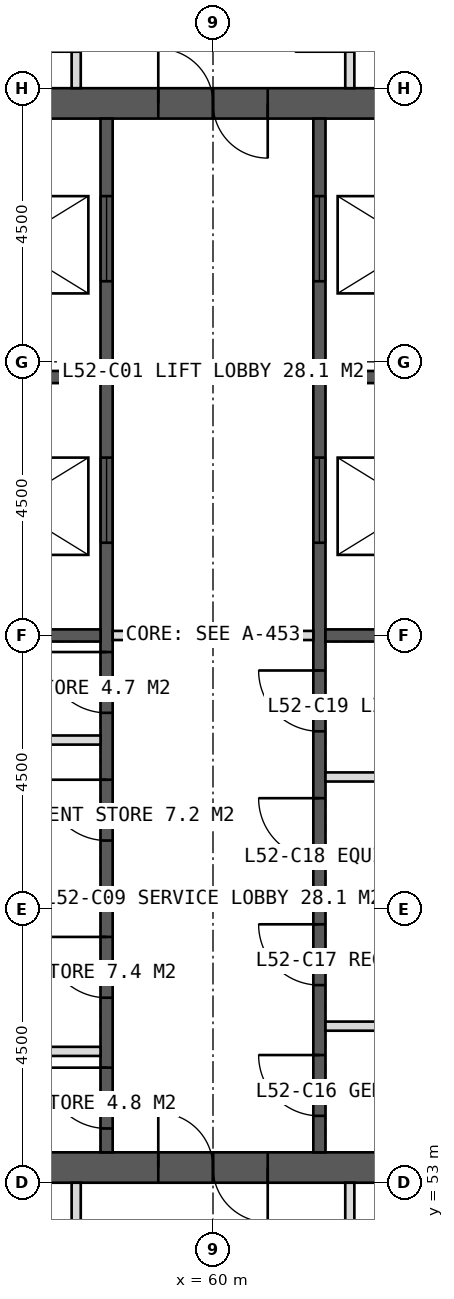
"""IFC4 building model, lengths in metres.
Left out: names, types, materials, properties, quantities, classifications, styles, units other than length and angle.
Written with IfcOpenShell. Run it as: python <this file> out.ifc"""

import sys

from ifc_helpers import new_model, si_unit, direction, frame, frame_2d, origin, place, context, subcontext, project, spatial, rectangle, extrude, element, fill, save


model = new_model("IFC4")
c1 = context("Model", 3, precision=1e-05, world=origin(), true_north=direction((0.0, 1.0)))
c2 = subcontext(c1, "Body", "Model", "MODEL_VIEW")
j1 = project(units=[si_unit("LENGTHUNIT", "METRE"), si_unit("PLANEANGLEUNIT", "RADIAN")], contexts=[c1])
p1 = place(None, origin())
s1 = spatial("IfcSite", under=j1, at=p1, CompositionType="ELEMENT")
p2 = place(p1, origin())
s2 = spatial("IfcBuilding", under=s1, at=p2, CompositionType="ELEMENT")
p3 = place(p2, frame((0.0, 0.0, 217.0)))
s3 = spatial("IfcBuildingStorey", under=s2, at=p3, CompositionType="ELEMENT", Elevation=217.0)
p4 = place(p3, frame((51.0, 70.75, 0.0), z_axis=(0.0, 0.0, 1.0), x_axis=(1.0, 0.0, 0.0)))
e1 = element("IfcWall", 1, at=p4, inside=s3, PredefinedType="SHEAR", context=c2, shape_type="SweptSolid", body=[
    extrude(rectangle(XDim=18.0, YDim=0.5, at=frame_2d((9.0, 0.0))), origin(), (0.0, 0.0, 1.0), 4.0),
])
p5 = place(p4, frame((8.1, 0.0, 0.0)))
e2 = element("IfcOpeningElement", 2, at=p5, cuts=e1, PredefinedType="OPENING", context=c2, shape_type="SweptSolid", body=[
    extrude(rectangle(XDim=1.8, YDim=2.2, at=frame_2d((0.9, 1.1))), frame((0.0, 0.26, 0.0), z_axis=(0.0, -1.0, 0.0), x_axis=(1.0, 0.0, 0.0)), (0.0, 0.0, 1.0), 0.52),
])
p6 = place(p3, frame((51.0, 53.25, 0.0), z_axis=(0.0, 0.0, 1.0), x_axis=(1.0, 0.0, 0.0)))
e3 = element("IfcWall", 3, at=p6, inside=s3, PredefinedType="SHEAR", context=c2, shape_type="SweptSolid", body=[
    extrude(rectangle(XDim=18.0, YDim=0.5, at=frame_2d((9.0, 0.0))), origin(), (0.0, 0.0, 1.0), 4.0),
])
p7 = place(p6, frame((8.1, 0.0, 0.0)))
e4 = element("IfcOpeningElement", 4, at=p7, cuts=e3, PredefinedType="OPENING", context=c2, shape_type="SweptSolid", body=[
    extrude(rectangle(XDim=1.8, YDim=2.2, at=frame_2d((0.9, 1.1))), frame((0.0, 0.26, 0.0), z_axis=(0.0, -1.0, 0.0), x_axis=(1.0, 0.0, 0.0)), (0.0, 0.0, 1.0), 0.52),
])
p8 = place(p3, frame((58.25, 53.5, 0.0), z_axis=(0.0, 0.0, 1.0), x_axis=(0.0, 1.0, 0.0)))
e5 = element("IfcWall", 5, at=p8, inside=s3, PredefinedType="SHEAR", context=c2, shape_type="SweptSolid", body=[
    extrude(rectangle(XDim=17.0, YDim=0.2, at=frame_2d((8.5, 0.0))), origin(), (0.0, 0.0, 1.0), 4.0),
])
p9 = place(p8, frame((0.393, 0.0, 0.0)))
e6 = element("IfcOpeningElement", 6, at=p9, cuts=e5, PredefinedType="OPENING", context=c2, shape_type="SweptSolid", body=[
    extrude(rectangle(XDim=1.0, YDim=2.1, at=frame_2d((0.5, 1.05))), frame((0.0, 0.11, 0.0), z_axis=(0.0, -1.0, 0.0), x_axis=(1.0, 0.0, 0.0)), (0.0, 0.0, 1.0), 0.22),
])
p10 = place(p8, frame((2.542, 0.0, 0.0)))
e7 = element("IfcOpeningElement", 7, at=p10, cuts=e5, PredefinedType="OPENING", context=c2, shape_type="SweptSolid", body=[
    extrude(rectangle(XDim=1.0, YDim=2.1, at=frame_2d((0.5, 1.05))), frame((0.0, 0.11, 0.0), z_axis=(0.0, -1.0, 0.0), x_axis=(1.0, 0.0, 0.0)), (0.0, 0.0, 1.0), 0.22),
])
p11 = place(p8, frame((5.127, 0.0, 0.0)))
e8 = element("IfcOpeningElement", 8, at=p11, cuts=e5, PredefinedType="OPENING", context=c2, shape_type="SweptSolid", body=[
    extrude(rectangle(XDim=1.0, YDim=2.1, at=frame_2d((0.5, 1.05))), frame((0.0, 0.11, 0.0), z_axis=(0.0, -1.0, 0.0), x_axis=(1.0, 0.0, 0.0)), (0.0, 0.0, 1.0), 0.22),
])
p12 = place(p8, frame((7.228, 0.0, 0.0)))
e9 = element("IfcOpeningElement", 9, at=p12, cuts=e5, PredefinedType="OPENING", context=c2, shape_type="SweptSolid", body=[
    extrude(rectangle(XDim=1.0, YDim=2.1, at=frame_2d((0.5, 1.05))), frame((0.0, 0.11, 0.0), z_axis=(0.0, -1.0, 0.0), x_axis=(1.0, 0.0, 0.0)), (0.0, 0.0, 1.0), 0.22),
])
p13 = place(p8, frame((10.025, 0.0, 0.0)))
e10 = element("IfcOpeningElement", 10, at=p13, cuts=e5, PredefinedType="OPENING", context=c2, shape_type="SweptSolid", body=[
    extrude(rectangle(XDim=1.4, YDim=2.2, at=frame_2d((0.7, 1.1))), frame((0.0, 0.11, 0.0), z_axis=(0.0, -1.0, 0.0), x_axis=(1.0, 0.0, 0.0)), (0.0, 0.0, 1.0), 0.22),
])
p14 = place(p8, frame((14.325, 0.0, 0.0)))
e11 = element("IfcOpeningElement", 11, at=p14, cuts=e5, PredefinedType="OPENING", context=c2, shape_type="SweptSolid", body=[
    extrude(rectangle(XDim=1.4, YDim=2.2, at=frame_2d((0.7, 1.1))), frame((0.0, 0.11, 0.0), z_axis=(0.0, -1.0, 0.0), x_axis=(1.0, 0.0, 0.0)), (0.0, 0.0, 1.0), 0.22),
])
p15 = place(p3, frame((61.75, 53.5, 0.0), z_axis=(0.0, 0.0, 1.0), x_axis=(0.0, 1.0, 0.0)))
e12 = element("IfcWall", 12, at=p15, inside=s3, PredefinedType="SHEAR", context=c2, shape_type="SweptSolid", body=[
    extrude(rectangle(XDim=17.0, YDim=0.2, at=frame_2d((8.5, 0.0))), origin(), (0.0, 0.0, 1.0), 4.0),
])
p16 = place(p15, frame((0.6, 0.0, 0.0)))
e13 = element("IfcOpeningElement", 13, at=p16, cuts=e12, PredefinedType="OPENING", context=c2, shape_type="SweptSolid", body=[
    extrude(rectangle(XDim=1.0, YDim=2.1, at=frame_2d((0.5, 1.05))), frame((0.0, 0.11, 0.0), z_axis=(0.0, -1.0, 0.0), x_axis=(1.0, 0.0, 0.0)), (0.0, 0.0, 1.0), 0.22),
])
p17 = place(p15, frame((2.75, 0.0, 0.0)))
e14 = element("IfcOpeningElement", 14, at=p17, cuts=e12, PredefinedType="OPENING", context=c2, shape_type="SweptSolid", body=[
    extrude(rectangle(XDim=1.0, YDim=2.1, at=frame_2d((0.5, 1.05))), frame((0.0, 0.11, 0.0), z_axis=(0.0, -1.0, 0.0), x_axis=(1.0, 0.0, 0.0)), (0.0, 0.0, 1.0), 0.22),
])
p18 = place(p15, frame((4.824, 0.0, 0.0)))
e15 = element("IfcOpeningElement", 15, at=p18, cuts=e12, PredefinedType="OPENING", context=c2, shape_type="SweptSolid", body=[
    extrude(rectangle(XDim=1.0, YDim=2.1, at=frame_2d((0.5, 1.05))), frame((0.0, 0.11, 0.0), z_axis=(0.0, -1.0, 0.0), x_axis=(1.0, 0.0, 0.0)), (0.0, 0.0, 1.0), 0.22),
])
p19 = place(p15, frame((6.924, 0.0, 0.0)))
e16 = element("IfcOpeningElement", 16, at=p19, cuts=e12, PredefinedType="OPENING", context=c2, shape_type="SweptSolid", body=[
    extrude(rectangle(XDim=1.0, YDim=2.1, at=frame_2d((0.5, 1.05))), frame((0.0, 0.11, 0.0), z_axis=(0.0, -1.0, 0.0), x_axis=(1.0, 0.0, 0.0)), (0.0, 0.0, 1.0), 0.22),
])
p20 = place(p15, frame((10.025, 0.0, 0.0)))
e17 = element("IfcOpeningElement", 17, at=p20, cuts=e12, PredefinedType="OPENING", context=c2, shape_type="SweptSolid", body=[
    extrude(rectangle(XDim=1.4, YDim=2.2, at=frame_2d((0.7, 1.1))), frame((0.0, 0.11, 0.0), z_axis=(0.0, -1.0, 0.0), x_axis=(1.0, 0.0, 0.0)), (0.0, 0.0, 1.0), 0.22),
])
p21 = place(p15, frame((14.325, 0.0, 0.0)))
e18 = element("IfcOpeningElement", 18, at=p21, cuts=e12, PredefinedType="OPENING", context=c2, shape_type="SweptSolid", body=[
    extrude(rectangle(XDim=1.4, YDim=2.2, at=frame_2d((0.7, 1.1))), frame((0.0, 0.11, 0.0), z_axis=(0.0, -1.0, 0.0), x_axis=(1.0, 0.0, 0.0)), (0.0, 0.0, 1.0), 0.22),
])
for number, where, z_axis, x_axis in (
    (19, (55.1, 57.75, 0.0), (0.0, 0.0, 1.0), (1.0, 0.0, 0.0)),
    (20, (61.85, 57.75, 0.0), (0.0, 0.0, 1.0), (1.0, 0.0, 0.0)),
    (21, (55.1, 62.0, 0.0), (0.0, 0.0, 1.0), (1.0, 0.0, 0.0)),
    (22, (61.85, 62.0, 0.0), (0.0, 0.0, 1.0), (1.0, 0.0, 0.0)),
    (23, (55.1, 66.25, 0.0), (0.0, 0.0, 1.0), (1.0, 0.0, 0.0)),
    (24, (61.85, 66.25, 0.0), (0.0, 0.0, 1.0), (1.0, 0.0, 0.0)),
):
    element("IfcWall", number, at=place(p3, frame(where, z_axis=z_axis, x_axis=x_axis)), inside=s3, PredefinedType="SHEAR", context=c2, shape_type="SweptSolid", body=[
        extrude(rectangle(XDim=3.05, YDim=0.2, at=frame_2d((1.525, 0.0))), origin(), (0.0, 0.0, 1.0), 4.0),
    ])
p22 = place(p3, frame((57.75, 71.0, 0.0), z_axis=(0.0, 0.0, 1.0), x_axis=(0.0, 1.0, 0.0)))
e25 = element("IfcWall", 25, at=p22, inside=s3, PredefinedType="PARTITIONING", context=c2, shape_type="SweptSolid", body=[
    extrude(rectangle(XDim=3.6, YDim=0.15, at=frame_2d((1.8, 0.0))), origin(), (0.0, 0.0, 1.0), 3.75),
])
p23 = place(p22, frame((0.6, 0.0, 0.0)))
e26 = element("IfcOpeningElement", 26, at=p23, cuts=e25, PredefinedType="OPENING", context=c2, shape_type="SweptSolid", body=[
    extrude(rectangle(XDim=0.9, YDim=2.1, at=frame_2d((0.45, 1.05))), frame((0.0, 0.085, 0.0), z_axis=(0.0, -1.0, 0.0), x_axis=(1.0, 0.0, 0.0)), (0.0, 0.0, 1.0), 0.17),
])
p24 = place(p3, frame((62.25, 71.0, 0.0), z_axis=(0.0, 0.0, 1.0), x_axis=(0.0, 1.0, 0.0)))
e27 = element("IfcWall", 27, at=p24, inside=s3, PredefinedType="PARTITIONING", context=c2, shape_type="SweptSolid", body=[
    extrude(rectangle(XDim=3.6, YDim=0.15, at=frame_2d((1.8, 0.0))), origin(), (0.0, 0.0, 1.0), 3.75),
])
p25 = place(p24, frame((0.6, 0.0, 0.0)))
e28 = element("IfcOpeningElement", 28, at=p25, cuts=e27, PredefinedType="OPENING", context=c2, shape_type="SweptSolid", body=[
    extrude(rectangle(XDim=0.9, YDim=2.1, at=frame_2d((0.45, 1.05))), frame((0.0, 0.085, 0.0), z_axis=(0.0, -1.0, 0.0), x_axis=(1.0, 0.0, 0.0)), (0.0, 0.0, 1.0), 0.17),
])
for number, where, z_axis, x_axis in (
    (29, (62.25, 53.0, 0.0), (0.0, 0.0, 1.0), (0.0, -1.0, 0.0)),
    (30, (57.75, 53.0, 0.0), (0.0, 0.0, 1.0), (0.0, -1.0, 0.0)),
):
    element("IfcWall", number, at=place(p3, frame(where, z_axis=z_axis, x_axis=x_axis)), inside=s3, PredefinedType="PARTITIONING", context=c2, shape_type="SweptSolid", body=[
        extrude(rectangle(XDim=3.6, YDim=0.15, at=frame_2d((1.8, 0.0))), origin(), (0.0, 0.0, 1.0), 3.75),
    ])
for number, where, z_axis, x_axis in (
    (31, (55.1, 55.16, 0.0), (0.0, 0.0, 1.0), (1.0, 0.0, 0.0)),
    (32, (61.85, 55.575, 0.0), (0.0, 0.0, 1.0), (1.0, 0.0, 0.0)),
    (33, (55.1, 60.28, 0.0), (0.0, 0.0, 1.0), (1.0, 0.0, 0.0)),
    (34, (61.85, 59.673, 0.0), (0.0, 0.0, 1.0), (1.0, 0.0, 0.0)),
):
    element("IfcWall", number, at=place(p3, frame(where, z_axis=z_axis, x_axis=x_axis)), inside=s3, PredefinedType="PARTITIONING", context=c2, shape_type="SweptSolid", body=[
        extrude(rectangle(XDim=3.05, YDim=0.15, at=frame_2d((1.525, 0.0))), origin(), (0.0, 0.0, 1.0), 3.75),
    ])
p26 = place(p3, frame((58.35, 62.0, 0.0), z_axis=(0.0, 0.0, 1.0), x_axis=(1.0, 0.0, 0.0)))
e35 = element("IfcWall", 35, at=p26, inside=s3, PredefinedType="PARTITIONING", context=c2, shape_type="SweptSolid", body=[
    extrude(rectangle(XDim=3.3, YDim=0.15, at=frame_2d((1.65, 0.0))), origin(), (0.0, 0.0, 1.0), 3.75),
])
p27 = place(p5, origin())
e36 = element("IfcDoor", 36, at=p27, inside=s3, OperationType="DOUBLE_DOOR_SINGLE_SWING", PredefinedType="DOOR", context=c2, shape_type="SweptSolid", body=[
    extrude(rectangle(XDim=1.8, YDim=2.2, at=frame_2d((0.9, 1.1))), frame((0.0, 0.025, 0.0), z_axis=(0.0, -1.0, 0.0), x_axis=(1.0, 0.0, 0.0)), (0.0, 0.0, 1.0), 0.05),
])
fill(e2, e36)
p28 = place(p9, origin())
e37 = element("IfcDoor", 37, at=p28, inside=s3, OperationType="SINGLE_SWING_RIGHT", PredefinedType="DOOR", context=c2, shape_type="SweptSolid", body=[
    extrude(rectangle(XDim=1.0, YDim=2.1, at=frame_2d((0.5, 1.05))), frame((0.0, 0.025, 0.0), z_axis=(0.0, -1.0, 0.0), x_axis=(1.0, 0.0, 0.0)), (0.0, 0.0, 1.0), 0.05),
])
fill(e6, e37)
p29 = place(p10, origin())
e38 = element("IfcDoor", 38, at=p29, inside=s3, OperationType="SINGLE_SWING_RIGHT", PredefinedType="DOOR", context=c2, shape_type="SweptSolid", body=[
    extrude(rectangle(XDim=1.0, YDim=2.1, at=frame_2d((0.5, 1.05))), frame((0.0, 0.025, 0.0), z_axis=(0.0, -1.0, 0.0), x_axis=(1.0, 0.0, 0.0)), (0.0, 0.0, 1.0), 0.05),
])
fill(e7, e38)
p30 = place(p16, origin())
e39 = element("IfcDoor", 39, at=p30, inside=s3, OperationType="SINGLE_SWING_RIGHT", PredefinedType="DOOR", context=c2, shape_type="SweptSolid", body=[
    extrude(rectangle(XDim=1.0, YDim=2.1, at=frame_2d((0.5, 1.05))), frame((0.0, 0.025, 0.0), z_axis=(0.0, -1.0, 0.0), x_axis=(1.0, 0.0, 0.0)), (0.0, 0.0, 1.0), 0.05),
])
fill(e13, e39)
p31 = place(p17, origin())
e40 = element("IfcDoor", 40, at=p31, inside=s3, OperationType="SINGLE_SWING_RIGHT", PredefinedType="DOOR", context=c2, shape_type="SweptSolid", body=[
    extrude(rectangle(XDim=1.0, YDim=2.1, at=frame_2d((0.5, 1.05))), frame((0.0, 0.025, 0.0), z_axis=(0.0, -1.0, 0.0), x_axis=(1.0, 0.0, 0.0)), (0.0, 0.0, 1.0), 0.05),
])
fill(e14, e40)
p32 = place(p11, origin())
e41 = element("IfcDoor", 41, at=p32, inside=s3, OperationType="SINGLE_SWING_RIGHT", PredefinedType="DOOR", context=c2, shape_type="SweptSolid", body=[
    extrude(rectangle(XDim=1.0, YDim=2.1, at=frame_2d((0.5, 1.05))), frame((0.0, 0.025, 0.0), z_axis=(0.0, -1.0, 0.0), x_axis=(1.0, 0.0, 0.0)), (0.0, 0.0, 1.0), 0.05),
])
fill(e8, e41)
p33 = place(p12, origin())
e42 = element("IfcDoor", 42, at=p33, inside=s3, OperationType="SINGLE_SWING_RIGHT", PredefinedType="DOOR", context=c2, shape_type="SweptSolid", body=[
    extrude(rectangle(XDim=1.0, YDim=2.1, at=frame_2d((0.5, 1.05))), frame((0.0, 0.025, 0.0), z_axis=(0.0, -1.0, 0.0), x_axis=(1.0, 0.0, 0.0)), (0.0, 0.0, 1.0), 0.05),
])
fill(e9, e42)
p34 = place(p18, origin())
e43 = element("IfcDoor", 43, at=p34, inside=s3, OperationType="SINGLE_SWING_RIGHT", PredefinedType="DOOR", context=c2, shape_type="SweptSolid", body=[
    extrude(rectangle(XDim=1.0, YDim=2.1, at=frame_2d((0.5, 1.05))), frame((0.0, 0.025, 0.0), z_axis=(0.0, -1.0, 0.0), x_axis=(1.0, 0.0, 0.0)), (0.0, 0.0, 1.0), 0.05),
])
fill(e15, e43)
p35 = place(p19, origin())
e44 = element("IfcDoor", 44, at=p35, inside=s3, OperationType="SINGLE_SWING_RIGHT", PredefinedType="DOOR", context=c2, shape_type="SweptSolid", body=[
    extrude(rectangle(XDim=1.0, YDim=2.1, at=frame_2d((0.5, 1.05))), frame((0.0, 0.025, 0.0), z_axis=(0.0, -1.0, 0.0), x_axis=(1.0, 0.0, 0.0)), (0.0, 0.0, 1.0), 0.05),
])
fill(e16, e44)
p36 = place(p13, origin())
e45 = element("IfcDoor", 45, at=p36, inside=s3, OperationType="SLIDING_TO_LEFT", PredefinedType="DOOR", context=c2, shape_type="SweptSolid", body=[
    extrude(rectangle(XDim=1.4, YDim=2.2, at=frame_2d((0.7, 1.1))), frame((0.0, 0.025, 0.0), z_axis=(0.0, -1.0, 0.0), x_axis=(1.0, 0.0, 0.0)), (0.0, 0.0, 1.0), 0.05),
])
fill(e10, e45)
p37 = place(p20, origin())
e46 = element("IfcDoor", 46, at=p37, inside=s3, OperationType="SLIDING_TO_LEFT", PredefinedType="DOOR", context=c2, shape_type="SweptSolid", body=[
    extrude(rectangle(XDim=1.4, YDim=2.2, at=frame_2d((0.7, 1.1))), frame((0.0, 0.025, 0.0), z_axis=(0.0, -1.0, 0.0), x_axis=(1.0, 0.0, 0.0)), (0.0, 0.0, 1.0), 0.05),
])
fill(e17, e46)
p38 = place(p14, origin())
e47 = element("IfcDoor", 47, at=p38, inside=s3, OperationType="SLIDING_TO_LEFT", PredefinedType="DOOR", context=c2, shape_type="SweptSolid", body=[
    extrude(rectangle(XDim=1.4, YDim=2.2, at=frame_2d((0.7, 1.1))), frame((0.0, 0.025, 0.0), z_axis=(0.0, -1.0, 0.0), x_axis=(1.0, 0.0, 0.0)), (0.0, 0.0, 1.0), 0.05),
])
fill(e11, e47)
p39 = place(p21, origin())
e48 = element("IfcDoor", 48, at=p39, inside=s3, OperationType="SLIDING_TO_LEFT", PredefinedType="DOOR", context=c2, shape_type="SweptSolid", body=[
    extrude(rectangle(XDim=1.4, YDim=2.2, at=frame_2d((0.7, 1.1))), frame((0.0, 0.025, 0.0), z_axis=(0.0, -1.0, 0.0), x_axis=(1.0, 0.0, 0.0)), (0.0, 0.0, 1.0), 0.05),
])
fill(e18, e48)
p40 = place(p7, origin())
e49 = element("IfcDoor", 49, at=p40, inside=s3, OperationType="DOUBLE_DOOR_SINGLE_SWING", PredefinedType="DOOR", context=c2, shape_type="SweptSolid", body=[
    extrude(rectangle(XDim=1.8, YDim=2.2, at=frame_2d((0.9, 1.1))), frame((0.0, 0.025, 0.0), z_axis=(0.0, -1.0, 0.0), x_axis=(1.0, 0.0, 0.0)), (0.0, 0.0, 1.0), 0.05),
])
fill(e4, e49)
save(model, sys.argv[1])
